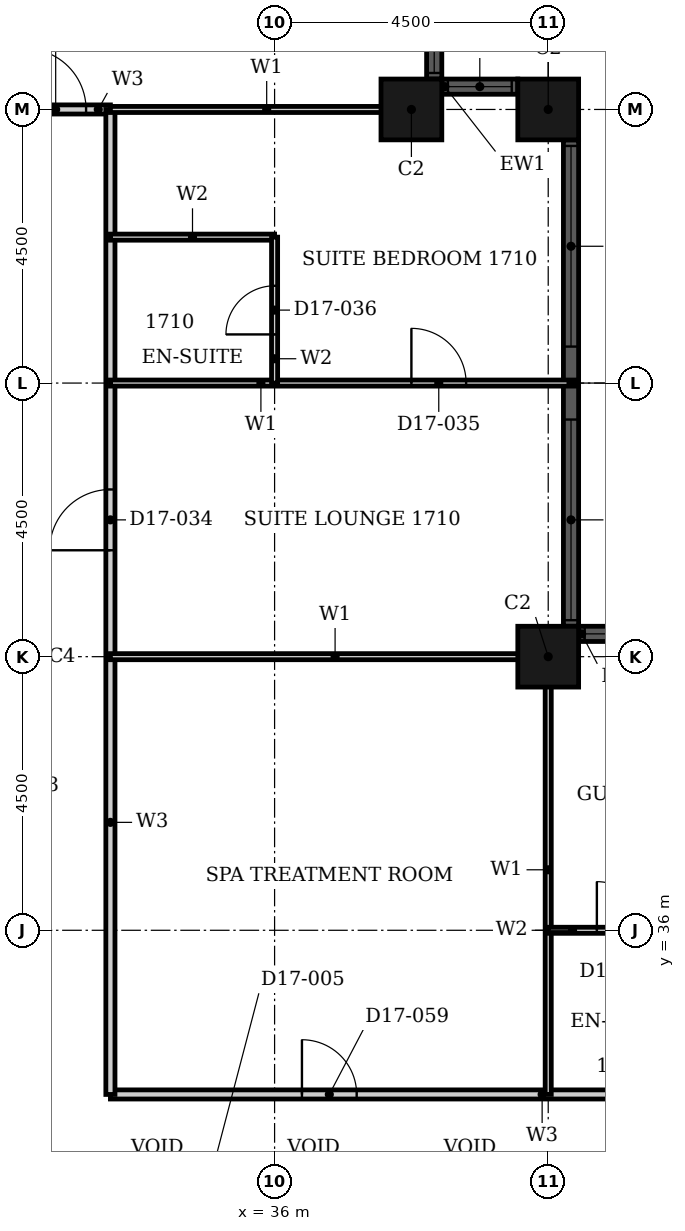
"""IFC4 building model, lengths in metres.
Left out: names, types, materials, properties, quantities, classifications, styles, units other than length and angle.
Written with IfcOpenShell. Run it as: python <this file> out.ifc"""

import sys

from ifc_helpers import new_model, si_unit, direction, frame, frame_2d, origin, origin_2d, place, context, subcontext, project, spatial, rectangle, hollow_rectangle, extrude, element, fill, save


model = new_model("IFC4")
c1 = context("Model", 3, precision=1e-05, world=origin(), true_north=direction((0.0, 1.0)))
c2 = subcontext(c1, "Body", "Model", "MODEL_VIEW")
j1 = project(units=[si_unit("LENGTHUNIT", "METRE"), si_unit("PLANEANGLEUNIT", "RADIAN")], contexts=[c1])
p1 = place(None, origin())
s1 = spatial("IfcSite", under=j1, at=p1, CompositionType="ELEMENT")
p2 = place(p1, origin())
s2 = spatial("IfcBuilding", under=s1, at=p2, CompositionType="ELEMENT")
p3 = place(p2, frame((0.0, 0.0, 74.4)))
s3 = spatial("IfcBuildingStorey", under=s2, at=p3, CompositionType="ELEMENT", Elevation=74.4)
for number, where, z_axis, x_axis in (
    (1, (40.5, 40.5, 0.0), (0.0, 0.0, 1.0), (1.0, 0.0, 0.0)),
    (2, (40.5, 49.5, 0.0), (0.0, 0.0, 1.0), (1.0, 0.0, 0.0)),
    (3, (38.25, 49.5, 0.0), (0.0, 0.0, 1.0), (1.0, 0.0, 0.0)),
):
    element("IfcColumn", number, at=place(p3, frame(where, z_axis=z_axis, x_axis=x_axis)), inside=s3, PredefinedType="COLUMN", context=c2, shape_type="SweptSolid", body=[
        extrude(hollow_rectangle(XDim=1.0, YDim=1.0, WallThickness=0.032, at=origin_2d()), origin(), (0.0, 0.0, 1.0), 3.6),
    ])
p4 = place(p3, frame((44.5, 40.875, 0.0), z_axis=(0.0, 0.0, 1.0), x_axis=(-1.0, 0.0, 0.0)))
e4 = element("IfcWall", 4, at=p4, inside=s3, PredefinedType="SOLIDWALL", context=c2, shape_type="SweptSolid", body=[
    extrude(rectangle(XDim=3.5, YDim=0.25, at=frame_2d((1.75, 0.0))), origin(), (0.0, 0.0, 1.0), 3.6),
])
p5 = place(p4, frame((0.1, 0.0, 0.9)))
e5 = element("IfcOpeningElement", 5, at=p5, cuts=e4, PredefinedType="OPENING", context=c2, shape_type="SweptSolid", body=[
    extrude(rectangle(XDim=3.3, YDim=2.08, at=frame_2d((1.65, 1.04))), frame((0.0, 0.135, 0.0), z_axis=(0.0, -1.0, 0.0), x_axis=(1.0, 0.0, 0.0)), (0.0, 0.0, 1.0), 0.27),
])
p6 = place(p3, frame((40.875, 41.0, 0.0), z_axis=(0.0, 0.0, 1.0), x_axis=(0.0, 1.0, 0.0)))
e6 = element("IfcWall", 6, at=p6, inside=s3, PredefinedType="SOLIDWALL", context=c2, shape_type="SweptSolid", body=[
    extrude(rectangle(XDim=8.0, YDim=0.25, at=frame_2d((4.0, 0.0))), origin(), (0.0, 0.0, 1.0), 3.6),
])
p7 = place(p6, frame((0.1, 0.0, 0.9)))
e7 = element("IfcOpeningElement", 7, at=p7, cuts=e6, PredefinedType="OPENING", context=c2, shape_type="SweptSolid", body=[
    extrude(rectangle(XDim=3.3, YDim=2.08, at=frame_2d((1.65, 1.04))), frame((0.0, 0.135, 0.0), z_axis=(0.0, -1.0, 0.0), x_axis=(1.0, 0.0, 0.0)), (0.0, 0.0, 1.0), 0.27),
])
p8 = place(p6, frame((4.6, 0.0, 0.9)))
e8 = element("IfcOpeningElement", 8, at=p8, cuts=e6, PredefinedType="OPENING", context=c2, shape_type="SweptSolid", body=[
    extrude(rectangle(XDim=3.3, YDim=2.08, at=frame_2d((1.65, 1.04))), frame((0.0, 0.135, 0.0), z_axis=(0.0, -1.0, 0.0), x_axis=(1.0, 0.0, 0.0)), (0.0, 0.0, 1.0), 0.27),
])
p9 = place(p3, frame((40.0, 49.875, 0.0), z_axis=(0.0, 0.0, 1.0), x_axis=(-1.0, 0.0, 0.0)))
e9 = element("IfcWall", 9, at=p9, inside=s3, PredefinedType="SOLIDWALL", context=c2, shape_type="SweptSolid", body=[
    extrude(rectangle(XDim=1.25, YDim=0.25, at=frame_2d((0.625, 0.0))), origin(), (0.0, 0.0, 1.0), 3.6),
])
p10 = place(p9, frame((0.1, 0.0, 0.9)))
e10 = element("IfcOpeningElement", 10, at=p10, cuts=e9, PredefinedType="OPENING", context=c2, shape_type="SweptSolid", body=[
    extrude(rectangle(XDim=1.05, YDim=2.08, at=frame_2d((0.525, 1.04))), frame((0.0, 0.135, 0.0), z_axis=(0.0, -1.0, 0.0), x_axis=(1.0, 0.0, 0.0)), (0.0, 0.0, 1.0), 0.27),
])
p11 = place(p3, frame((38.625, 50.0, 0.0), z_axis=(0.0, 0.0, 1.0), x_axis=(0.0, 1.0, 0.0)))
e11 = element("IfcWall", 11, at=p11, inside=s3, PredefinedType="SOLIDWALL", context=c2, shape_type="SweptSolid", body=[
    extrude(rectangle(XDim=1.25, YDim=0.25, at=frame_2d((0.625, 0.0))), origin(), (0.0, 0.0, 1.0), 3.6),
])
p12 = place(p11, frame((0.1, 0.0, 0.9)))
e12 = element("IfcOpeningElement", 12, at=p12, cuts=e11, PredefinedType="OPENING", context=c2, shape_type="SweptSolid", body=[
    extrude(rectangle(XDim=1.05, YDim=2.08, at=frame_2d((0.525, 1.04))), frame((0.0, 0.135, 0.0), z_axis=(0.0, -1.0, 0.0), x_axis=(1.0, 0.0, 0.0)), (0.0, 0.0, 1.0), 0.27),
])
p13 = place(p3, frame((33.3, 33.3, 0.0), z_axis=(0.0, 0.0, 1.0), x_axis=(1.0, 0.0, 0.0)))
e13 = element("IfcWall", 13, at=p13, inside=s3, PredefinedType="PARTITIONING", context=c2, shape_type="SweptSolid", body=[
    extrude(rectangle(XDim=13.5, YDim=0.15, at=frame_2d((6.75, 0.0))), origin(), (0.0, 0.0, 1.0), 3.3),
])
p14 = place(p13, frame((10.15, 0.0, 0.0)))
e14 = element("IfcOpeningElement", 14, at=p14, cuts=e13, PredefinedType="OPENING", context=c2, shape_type="SweptSolid", body=[
    extrude(rectangle(XDim=1.0, YDim=2.1, at=frame_2d((0.5, 1.05))), frame((0.0, 0.085, 0.0), z_axis=(0.0, -1.0, 0.0), x_axis=(1.0, 0.0, 0.0)), (0.0, 0.0, 1.0), 0.17),
])
p15 = place(p13, frame((12.15, 0.0, 0.0)))
e15 = element("IfcOpeningElement", 15, at=p15, cuts=e13, PredefinedType="OPENING", context=c2, shape_type="SweptSolid", body=[
    extrude(rectangle(XDim=0.9, YDim=2.1, at=frame_2d((0.45, 1.05))), frame((0.0, 0.085, 0.0), z_axis=(0.0, -1.0, 0.0), x_axis=(1.0, 0.0, 0.0)), (0.0, 0.0, 1.0), 0.17),
])
p16 = place(p13, frame((3.15, 0.0, 0.0)))
e16 = element("IfcOpeningElement", 16, at=p16, cuts=e13, PredefinedType="OPENING", context=c2, shape_type="SweptSolid", body=[
    extrude(rectangle(XDim=0.9, YDim=2.1, at=frame_2d((0.45, 1.05))), frame((0.0, 0.085, 0.0), z_axis=(0.0, -1.0, 0.0), x_axis=(1.0, 0.0, 0.0)), (0.0, 0.0, 1.0), 0.17),
])
p17 = place(p3, frame((31.5, 49.5, 0.0), z_axis=(0.0, 0.0, 1.0), x_axis=(1.0, 0.0, 0.0)))
e17 = element("IfcWall", 17, at=p17, inside=s3, PredefinedType="PARTITIONING", context=c2, shape_type="SweptSolid", body=[
    extrude(rectangle(XDim=1.8, YDim=0.15, at=frame_2d((0.9, 0.0))), origin(), (0.0, 0.0, 1.0), 3.3),
])
p18 = place(p17, frame((0.4, 0.0, 0.0)))
e18 = element("IfcOpeningElement", 18, at=p18, cuts=e17, PredefinedType="OPENING", context=c2, shape_type="SweptSolid", body=[
    extrude(rectangle(XDim=1.0, YDim=2.1, at=frame_2d((0.5, 1.05))), frame((0.0, 0.085, 0.0), z_axis=(0.0, -1.0, 0.0), x_axis=(1.0, 0.0, 0.0)), (0.0, 0.0, 1.0), 0.17),
])
p19 = place(p3, frame((33.3, 33.3, 0.0), z_axis=(0.0, 0.0, 1.0), x_axis=(0.0, 1.0, 0.0)))
e19 = element("IfcWall", 19, at=p19, inside=s3, PredefinedType="PARTITIONING", context=c2, shape_type="SweptSolid", body=[
    extrude(rectangle(XDim=16.2, YDim=0.15, at=frame_2d((8.1, 0.0))), origin(), (0.0, 0.0, 1.0), 3.3),
])
p20 = place(p19, frame((8.95, 0.0, 0.0)))
e20 = element("IfcOpeningElement", 20, at=p20, cuts=e19, PredefinedType="OPENING", context=c2, shape_type="SweptSolid", body=[
    extrude(rectangle(XDim=1.0, YDim=2.1, at=frame_2d((0.5, 1.05))), frame((0.0, 0.085, 0.0), z_axis=(0.0, -1.0, 0.0), x_axis=(1.0, 0.0, 0.0)), (0.0, 0.0, 1.0), 0.17),
])
p21 = place(p3, frame((33.3, 40.5, 0.0), z_axis=(0.0, 0.0, 1.0), x_axis=(1.0, 0.0, 0.0)))
e21 = element("IfcWall", 21, at=p21, inside=s3, PredefinedType="PARTITIONING", context=c2, shape_type="SweptSolid", body=[
    extrude(rectangle(XDim=7.39, YDim=0.1, at=frame_2d((3.695, 0.0))), origin(), (0.0, 0.0, 1.0), 2.38),
])
p22 = place(p3, frame((33.3, 45.0, 0.0), z_axis=(0.0, 0.0, 1.0), x_axis=(1.0, 0.0, 0.0)))
e22 = element("IfcWall", 22, at=p22, inside=s3, PredefinedType="PARTITIONING", context=c2, shape_type="SweptSolid", body=[
    extrude(rectangle(XDim=7.64, YDim=0.1, at=frame_2d((3.82, 0.0))), origin(), (0.0, 0.0, 1.0), 3.3),
])
p23 = place(p22, frame((4.95, 0.0, 0.0)))
e23 = element("IfcOpeningElement", 23, at=p23, cuts=e22, PredefinedType="OPENING", context=c2, shape_type="SweptSolid", body=[
    extrude(rectangle(XDim=0.9, YDim=2.1, at=frame_2d((0.45, 1.05))), frame((0.0, 0.06, 0.0), z_axis=(0.0, -1.0, 0.0), x_axis=(1.0, 0.0, 0.0)), (0.0, 0.0, 1.0), 0.12),
])
p24 = place(p3, frame((33.3, 49.5, 0.0), z_axis=(0.0, 0.0, 1.0), x_axis=(1.0, 0.0, 0.0)))
e24 = element("IfcWall", 24, at=p24, inside=s3, PredefinedType="PARTITIONING", context=c2, shape_type="SweptSolid", body=[
    extrude(rectangle(XDim=5.14, YDim=0.1, at=frame_2d((2.57, 0.0))), origin(), (0.0, 0.0, 1.0), 3.3),
])
p25 = place(p3, frame((40.5, 33.3, 0.0), z_axis=(0.0, 0.0, 1.0), x_axis=(0.0, 1.0, 0.0)))
e25 = element("IfcWall", 25, at=p25, inside=s3, PredefinedType="PARTITIONING", context=c2, shape_type="SweptSolid", body=[
    extrude(rectangle(XDim=7.39, YDim=0.1, at=frame_2d((3.695, 0.0))), origin(), (0.0, 0.0, 1.0), 3.3),
])
p26 = place(p3, frame((40.5, 36.0, 0.0), z_axis=(0.0, 0.0, 1.0), x_axis=(1.0, 0.0, 0.0)))
e26 = element("IfcWall", 26, at=p26, inside=s3, PredefinedType="PARTITIONING", context=c2, shape_type="SweptSolid", body=[
    extrude(rectangle(XDim=2.4, YDim=0.1, at=frame_2d((1.2, 0.0))), origin(), (0.0, 0.0, 1.0), 3.3),
])
p27 = place(p26, frame((0.8, 0.0, 0.0)))
e27 = element("IfcOpeningElement", 27, at=p27, cuts=e26, PredefinedType="OPENING", context=c2, shape_type="SweptSolid", body=[
    extrude(rectangle(XDim=0.8, YDim=2.1, at=frame_2d((0.4, 1.05))), frame((0.0, 0.06, 0.0), z_axis=(0.0, -1.0, 0.0), x_axis=(1.0, 0.0, 0.0)), (0.0, 0.0, 1.0), 0.12),
])
p28 = place(p3, frame((33.3, 47.4, 0.0), z_axis=(0.0, 0.0, 1.0), x_axis=(1.0, 0.0, 0.0)))
e28 = element("IfcWall", 28, at=p28, inside=s3, PredefinedType="PARTITIONING", context=c2, shape_type="SweptSolid", body=[
    extrude(rectangle(XDim=2.7, YDim=0.1, at=frame_2d((1.35, 0.0))), origin(), (0.0, 0.0, 1.0), 3.3),
])
p29 = place(p3, frame((36.0, 45.0, 0.0), z_axis=(0.0, 0.0, 1.0), x_axis=(0.0, 1.0, 0.0)))
e29 = element("IfcWall", 29, at=p29, inside=s3, PredefinedType="PARTITIONING", context=c2, shape_type="SweptSolid", body=[
    extrude(rectangle(XDim=2.4, YDim=0.1, at=frame_2d((1.2, 0.0))), origin(), (0.0, 0.0, 1.0), 2.58),
])
p30 = place(p29, frame((0.8, 0.0, 0.0)))
e30 = element("IfcOpeningElement", 30, at=p30, cuts=e29, PredefinedType="OPENING", context=c2, shape_type="SweptSolid", body=[
    extrude(rectangle(XDim=0.8, YDim=2.1, at=frame_2d((0.4, 1.05))), frame((0.0, 0.06, 0.0), z_axis=(0.0, -1.0, 0.0), x_axis=(1.0, 0.0, 0.0)), (0.0, 0.0, 1.0), 0.12),
])
p31 = place(p5, origin())
e31 = element("IfcWindow", 31, at=p31, inside=s3, PartitioningType="SINGLE_PANEL", PredefinedType="WINDOW", context=c2, shape_type="SweptSolid", body=[
    extrude(rectangle(XDim=3.3, YDim=2.08, at=frame_2d((1.65, 1.04))), frame((0.0, 0.03, 0.0), z_axis=(0.0, -1.0, 0.0), x_axis=(1.0, 0.0, 0.0)), (0.0, 0.0, 1.0), 0.06),
])
fill(e5, e31)
p32 = place(p7, origin())
e32 = element("IfcWindow", 32, at=p32, inside=s3, PartitioningType="SINGLE_PANEL", PredefinedType="WINDOW", context=c2, shape_type="SweptSolid", body=[
    extrude(rectangle(XDim=3.3, YDim=2.08, at=frame_2d((1.65, 1.04))), frame((0.0, 0.03, 0.0), z_axis=(0.0, -1.0, 0.0), x_axis=(1.0, 0.0, 0.0)), (0.0, 0.0, 1.0), 0.06),
])
fill(e7, e32)
p33 = place(p8, origin())
e33 = element("IfcWindow", 33, at=p33, inside=s3, PartitioningType="SINGLE_PANEL", PredefinedType="WINDOW", context=c2, shape_type="SweptSolid", body=[
    extrude(rectangle(XDim=3.3, YDim=2.08, at=frame_2d((1.65, 1.04))), frame((0.0, 0.03, 0.0), z_axis=(0.0, -1.0, 0.0), x_axis=(1.0, 0.0, 0.0)), (0.0, 0.0, 1.0), 0.06),
])
fill(e8, e33)
p34 = place(p10, origin())
e34 = element("IfcWindow", 34, at=p34, inside=s3, PartitioningType="SINGLE_PANEL", PredefinedType="WINDOW", context=c2, shape_type="SweptSolid", body=[
    extrude(rectangle(XDim=1.05, YDim=2.08, at=frame_2d((0.525, 1.04))), frame((0.0, 0.03, 0.0), z_axis=(0.0, -1.0, 0.0), x_axis=(1.0, 0.0, 0.0)), (0.0, 0.0, 1.0), 0.06),
])
fill(e10, e34)
p35 = place(p12, origin())
e35 = element("IfcWindow", 35, at=p35, inside=s3, PartitioningType="SINGLE_PANEL", PredefinedType="WINDOW", context=c2, shape_type="SweptSolid", body=[
    extrude(rectangle(XDim=1.05, YDim=2.08, at=frame_2d((0.525, 1.04))), frame((0.0, 0.03, 0.0), z_axis=(0.0, -1.0, 0.0), x_axis=(1.0, 0.0, 0.0)), (0.0, 0.0, 1.0), 0.06),
])
fill(e12, e35)
p36 = place(p20, origin())
e36 = element("IfcDoor", 36, at=p36, inside=s3, OperationType="SINGLE_SWING_RIGHT", PredefinedType="DOOR", context=c2, shape_type="SweptSolid", body=[
    extrude(rectangle(XDim=1.0, YDim=2.1, at=frame_2d((0.5, 1.05))), frame((0.0, 0.025, 0.0), z_axis=(0.0, -1.0, 0.0), x_axis=(1.0, 0.0, 0.0)), (0.0, 0.0, 1.0), 0.05),
])
fill(e20, e36)
p37 = place(p23, origin())
e37 = element("IfcDoor", 37, at=p37, inside=s3, OperationType="SINGLE_SWING_RIGHT", PredefinedType="DOOR", context=c2, shape_type="SweptSolid", body=[
    extrude(rectangle(XDim=0.9, YDim=2.1, at=frame_2d((0.45, 1.05))), frame((0.0, 0.025, 0.0), z_axis=(0.0, -1.0, 0.0), x_axis=(1.0, 0.0, 0.0)), (0.0, 0.0, 1.0), 0.05),
])
fill(e23, e37)
p38 = place(p30, origin())
e38 = element("IfcDoor", 38, at=p38, inside=s3, OperationType="SINGLE_SWING_RIGHT", PredefinedType="DOOR", context=c2, shape_type="SweptSolid", body=[
    extrude(rectangle(XDim=0.8, YDim=2.1, at=frame_2d((0.4, 1.05))), frame((0.0, 0.025, 0.0), z_axis=(0.0, -1.0, 0.0), x_axis=(1.0, 0.0, 0.0)), (0.0, 0.0, 1.0), 0.05),
])
fill(e30, e38)
p39 = place(p18, origin())
e39 = element("IfcDoor", 39, at=p39, inside=s3, OperationType="SINGLE_SWING_LEFT", PredefinedType="DOOR", context=c2, shape_type="SweptSolid", body=[
    extrude(rectangle(XDim=1.0, YDim=2.1, at=frame_2d((0.5, 1.05))), frame((0.0, 0.025, 0.0), z_axis=(0.0, -1.0, 0.0), x_axis=(1.0, 0.0, 0.0)), (0.0, 0.0, 1.0), 0.05),
])
fill(e18, e39)
p40 = place(p27, origin())
e40 = element("IfcDoor", 40, at=p40, inside=s3, OperationType="SINGLE_SWING_RIGHT", PredefinedType="DOOR", context=c2, shape_type="SweptSolid", body=[
    extrude(rectangle(XDim=0.8, YDim=2.1, at=frame_2d((0.4, 1.05))), frame((0.0, 0.025, 0.0), z_axis=(0.0, -1.0, 0.0), x_axis=(1.0, 0.0, 0.0)), (0.0, 0.0, 1.0), 0.05),
])
fill(e27, e40)
p41 = place(p16, origin())
e41 = element("IfcDoor", 41, at=p41, inside=s3, OperationType="SINGLE_SWING_RIGHT", PredefinedType="DOOR", context=c2, shape_type="SweptSolid", body=[
    extrude(rectangle(XDim=0.9, YDim=2.1, at=frame_2d((0.45, 1.05))), frame((0.0, 0.025, 0.0), z_axis=(0.0, -1.0, 0.0), x_axis=(1.0, 0.0, 0.0)), (0.0, 0.0, 1.0), 0.05),
])
fill(e16, e41)
save(model, sys.argv[1])
